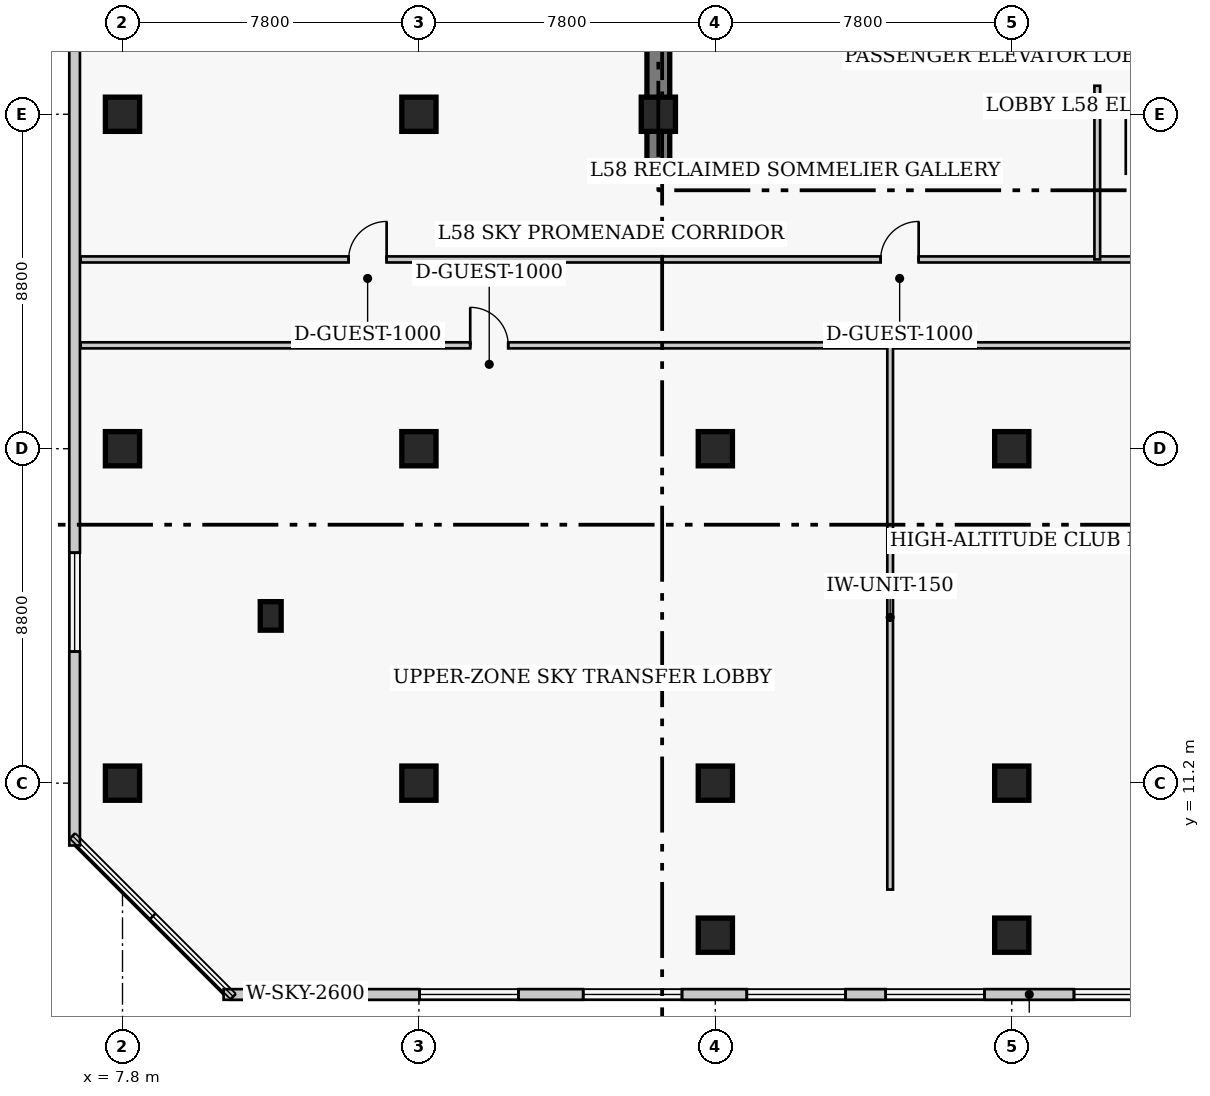
"""IFC4 building model, lengths in metres.
Left out: names, types, materials, properties, quantities, classifications, styles, units other than length and angle.
Written with IfcOpenShell. Run it as: python <this file> out.ifc"""

import sys

from ifc_helpers import new_model, si_unit, direction, frame, frame_2d, origin, origin_2d, place, context, subcontext, project, spatial, rectangle, extrude, element, fill, save


model = new_model("IFC4")
c1 = context("Model", 3, precision=1e-05, world=origin(), true_north=direction((0.0, 1.0)))
c2 = subcontext(c1, "Body", "Model", "MODEL_VIEW")
j1 = project(units=[si_unit("LENGTHUNIT", "METRE"), si_unit("PLANEANGLEUNIT", "RADIAN")], contexts=[c1])
p1 = place(None, origin())
s1 = spatial("IfcSite", under=j1, at=p1, CompositionType="ELEMENT")
p2 = place(p1, origin())
s2 = spatial("IfcBuilding", under=s1, at=p2, CompositionType="ELEMENT")
p3 = place(p2, frame((0.0, 0.0, 231.9)))
s3 = spatial("IfcBuildingStorey", under=s2, at=p3, CompositionType="ELEMENT", Elevation=231.9)
p4 = place(p3, frame((21.9, 27.05, 0.0), z_axis=(0.0, 0.0, 1.0), x_axis=(0.0, 1.0, 0.0)))
e1 = element("IfcWall", 1, at=p4, inside=s3, PredefinedType="SHEAR", context=c2, shape_type="SweptSolid", body=[
    extrude(rectangle(XDim=13.57, YDim=0.6, at=frame_2d((6.785, 0.0))), origin(), (0.0, 0.0, 1.0), 4.6),
])
for number, where, z_axis, x_axis in (
    (2, (7.8, 11.2, 0.0), (0.0, 0.0, 1.0), (1.0, 0.0, 0.0)),
    (3, (7.8, 20.0, 0.0), (0.0, 0.0, 1.0), (1.0, 0.0, 0.0)),
    (4, (7.8, 28.8, 0.0), (0.0, 0.0, 1.0), (1.0, 0.0, 0.0)),
    (5, (15.6, 11.2, 0.0), (0.0, 0.0, 1.0), (1.0, 0.0, 0.0)),
    (6, (15.6, 20.0, 0.0), (0.0, 0.0, 1.0), (1.0, 0.0, 0.0)),
    (7, (15.6, 28.8, 0.0), (0.0, 0.0, 1.0), (1.0, 0.0, 0.0)),
    (8, (23.4, 11.2, 0.0), (0.0, 0.0, 1.0), (1.0, 0.0, 0.0)),
    (9, (23.4, 20.0, 0.0), (0.0, 0.0, 1.0), (1.0, 0.0, 0.0)),
    (10, (31.2, 11.2, 0.0), (0.0, 0.0, 1.0), (1.0, 0.0, 0.0)),
    (11, (31.2, 20.0, 0.0), (0.0, 0.0, 1.0), (1.0, 0.0, 0.0)),
    (12, (21.9, 28.8, 0.0), (0.0, 0.0, 1.0), (1.0, 0.0, 0.0)),
    (13, (23.4, 7.2, 0.0), (0.0, 0.0, 1.0), (1.0, 0.0, 0.0)),
    (14, (31.2, 7.2, 0.0), (0.0, 0.0, 1.0), (1.0, 0.0, 0.0)),
):
    element("IfcColumn", number, at=place(p3, frame(where, z_axis=z_axis, x_axis=x_axis)), inside=s3, PredefinedType="COLUMN", context=c2, shape_type="SweptSolid", body=[
        extrude(rectangle(XDim=0.9, YDim=0.9, at=origin_2d()), origin(), (0.0, 0.0, 1.0), 4.6),
    ])
p5 = place(p3, frame((11.7, 15.6, 0.0), z_axis=(0.0, 0.0, 1.0), x_axis=(1.0, 0.0, 0.0)))
e15 = element("IfcColumn", 15, at=p5, inside=s3, PredefinedType="PILASTER", context=c2, shape_type="SweptSolid", body=[
    extrude(rectangle(XDim=0.55, YDim=0.75, at=origin_2d()), origin(), (0.0, 0.0, 1.0), 4.6),
])
p6 = place(p3, frame((10.46, 5.64, 0.0), z_axis=(0.0, 0.0, 1.0), x_axis=(1.0, 0.0, 0.0)))
e16 = element("IfcWall", 16, at=p6, inside=s3, PredefinedType="SOLIDWALL", context=c2, shape_type="SweptSolid", body=[
    extrude(rectangle(XDim=25.83, YDim=0.28, at=frame_2d((12.915, 0.0))), origin(), (0.0, 0.0, 1.0), 4.35),
])
p7 = place(p6, frame((0.853, 0.0, 0.65)))
e17 = element("IfcOpeningElement", 17, at=p7, cuts=e16, PredefinedType="OPENING", context=c2, shape_type="SweptSolid", body=[
    extrude(rectangle(XDim=2.6, YDim=2.2, at=frame_2d((1.3, 1.1))), frame((0.0, 0.15, 0.0), z_axis=(0.0, -1.0, 0.0), x_axis=(1.0, 0.0, 0.0)), (0.0, 0.0, 1.0), 0.3),
])
p8 = place(p6, frame((5.157, 0.0, 0.65)))
e18 = element("IfcOpeningElement", 18, at=p8, cuts=e16, PredefinedType="OPENING", context=c2, shape_type="SweptSolid", body=[
    extrude(rectangle(XDim=2.6, YDim=2.2, at=frame_2d((1.3, 1.1))), frame((0.0, 0.15, 0.0), z_axis=(0.0, -1.0, 0.0), x_axis=(1.0, 0.0, 0.0)), (0.0, 0.0, 1.0), 0.3),
])
p9 = place(p6, frame((9.462, 0.0, 0.65)))
e19 = element("IfcOpeningElement", 19, at=p9, cuts=e16, PredefinedType="OPENING", context=c2, shape_type="SweptSolid", body=[
    extrude(rectangle(XDim=2.6, YDim=2.2, at=frame_2d((1.3, 1.1))), frame((0.0, 0.15, 0.0), z_axis=(0.0, -1.0, 0.0), x_axis=(1.0, 0.0, 0.0)), (0.0, 0.0, 1.0), 0.3),
])
p10 = place(p6, frame((13.768, 0.0, 0.65)))
e20 = element("IfcOpeningElement", 20, at=p10, cuts=e16, PredefinedType="OPENING", context=c2, shape_type="SweptSolid", body=[
    extrude(rectangle(XDim=2.6, YDim=2.2, at=frame_2d((1.3, 1.1))), frame((0.0, 0.15, 0.0), z_axis=(0.0, -1.0, 0.0), x_axis=(1.0, 0.0, 0.0)), (0.0, 0.0, 1.0), 0.3),
])
p11 = place(p6, frame((17.423, 0.0, 0.65)))
e21 = element("IfcOpeningElement", 21, at=p11, cuts=e16, PredefinedType="OPENING", context=c2, shape_type="SweptSolid", body=[
    extrude(rectangle(XDim=2.6, YDim=2.2, at=frame_2d((1.3, 1.1))), frame((0.0, 0.15, 0.0), z_axis=(0.0, -1.0, 0.0), x_axis=(1.0, 0.0, 0.0)), (0.0, 0.0, 1.0), 0.3),
])
p12 = place(p6, frame((22.377, 0.0, 0.65)))
e22 = element("IfcOpeningElement", 22, at=p12, cuts=e16, PredefinedType="OPENING", context=c2, shape_type="SweptSolid", body=[
    extrude(rectangle(XDim=2.6, YDim=2.2, at=frame_2d((1.3, 1.1))), frame((0.0, 0.15, 0.0), z_axis=(0.0, -1.0, 0.0), x_axis=(1.0, 0.0, 0.0)), (0.0, 0.0, 1.0), 0.3),
])
p13 = place(p3, frame((6.54, 39.44, 0.0), z_axis=(0.0, 0.0, 1.0), x_axis=(0.0, -1.0, 0.0)))
e23 = element("IfcWall", 23, at=p13, inside=s3, PredefinedType="SOLIDWALL", context=c2, shape_type="SweptSolid", body=[
    extrude(rectangle(XDim=29.88, YDim=0.28, at=frame_2d((14.94, 0.0))), origin(), (0.0, 0.0, 1.0), 4.35),
])
p14 = place(p13, frame((1.984, 0.0, 0.65)))
e24 = element("IfcOpeningElement", 24, at=p14, cuts=e23, PredefinedType="OPENING", context=c2, shape_type="SweptSolid", body=[
    extrude(rectangle(XDim=2.6, YDim=2.2, at=frame_2d((1.3, 1.1))), frame((0.0, 0.15, 0.0), z_axis=(0.0, -1.0, 0.0), x_axis=(1.0, 0.0, 0.0)), (0.0, 0.0, 1.0), 0.3),
])
p15 = place(p13, frame((5.103, 0.0, 0.65)))
e25 = element("IfcOpeningElement", 25, at=p15, cuts=e23, PredefinedType="OPENING", context=c2, shape_type="SweptSolid", body=[
    extrude(rectangle(XDim=2.6, YDim=2.2, at=frame_2d((1.3, 1.1))), frame((0.0, 0.15, 0.0), z_axis=(0.0, -1.0, 0.0), x_axis=(1.0, 0.0, 0.0)), (0.0, 0.0, 1.0), 0.3),
])
p16 = place(p13, frame((22.177, 0.0, 0.65)))
e26 = element("IfcOpeningElement", 26, at=p16, cuts=e23, PredefinedType="OPENING", context=c2, shape_type="SweptSolid", body=[
    extrude(rectangle(XDim=2.6, YDim=2.2, at=frame_2d((1.3, 1.1))), frame((0.0, 0.15, 0.0), z_axis=(0.0, -1.0, 0.0), x_axis=(1.0, 0.0, 0.0)), (0.0, 0.0, 1.0), 0.3),
])
p17 = place(p3, frame((6.7, 22.72, 0.0), z_axis=(0.0, 0.0, 1.0), x_axis=(1.0, 0.0, 0.0)))
e27 = element("IfcWall", 27, at=p17, inside=s3, PredefinedType="PARTITIONING", context=c2, shape_type="SweptSolid", body=[
    extrude(rectangle(XDim=64.6, YDim=0.16, at=frame_2d((32.3, 0.0))), origin(), (0.0, 0.0, 1.0), 4.35),
])
p18 = place(p17, frame((10.25, 0.0, 0.0)))
e28 = element("IfcOpeningElement", 28, at=p18, cuts=e27, PredefinedType="OPENING", context=c2, shape_type="SweptSolid", body=[
    extrude(rectangle(XDim=1.0, YDim=2.15, at=frame_2d((0.5, 1.075))), frame((0.0, 0.09, 0.0), z_axis=(0.0, -1.0, 0.0), x_axis=(1.0, 0.0, 0.0)), (0.0, 0.0, 1.0), 0.18),
])
p19 = place(p17, frame((30.8, 0.0, 0.0)))
e29 = element("IfcOpeningElement", 29, at=p19, cuts=e27, PredefinedType="OPENING", context=c2, shape_type="SweptSolid", body=[
    extrude(rectangle(XDim=1.0, YDim=2.15, at=frame_2d((0.5, 1.075))), frame((0.0, 0.09, 0.0), z_axis=(0.0, -1.0, 0.0), x_axis=(1.0, 0.0, 0.0)), (0.0, 0.0, 1.0), 0.18),
])
p20 = place(p17, frame((52.35, 0.0, 0.0)))
e30 = element("IfcOpeningElement", 30, at=p20, cuts=e27, PredefinedType="OPENING", context=c2, shape_type="SweptSolid", body=[
    extrude(rectangle(XDim=1.0, YDim=2.15, at=frame_2d((0.5, 1.075))), frame((0.0, 0.09, 0.0), z_axis=(0.0, -1.0, 0.0), x_axis=(1.0, 0.0, 0.0)), (0.0, 0.0, 1.0), 0.18),
])
p21 = place(p3, frame((6.7, 24.98, 0.0), z_axis=(0.0, 0.0, 1.0), x_axis=(1.0, 0.0, 0.0)))
e31 = element("IfcWall", 31, at=p21, inside=s3, PredefinedType="PARTITIONING", context=c2, shape_type="SweptSolid", body=[
    extrude(rectangle(XDim=64.6, YDim=0.16, at=frame_2d((32.3, 0.0))), origin(), (0.0, 0.0, 1.0), 4.35),
])
p22 = place(p21, frame((30.4, 0.0, 0.0)))
e32 = element("IfcOpeningElement", 32, at=p22, cuts=e31, PredefinedType="OPENING", context=c2, shape_type="SweptSolid", body=[
    extrude(rectangle(XDim=1.8, YDim=2.2, at=frame_2d((0.9, 1.1))), frame((0.0, 0.09, 0.0), z_axis=(0.0, -1.0, 0.0), x_axis=(1.0, 0.0, 0.0)), (0.0, 0.0, 1.0), 0.18),
])
p23 = place(p21, frame((21.05, 0.0, 0.0)))
e33 = element("IfcOpeningElement", 33, at=p23, cuts=e31, PredefinedType="OPENING", context=c2, shape_type="SweptSolid", body=[
    extrude(rectangle(XDim=1.0, YDim=2.15, at=frame_2d((0.5, 1.075))), frame((0.0, 0.09, 0.0), z_axis=(0.0, -1.0, 0.0), x_axis=(1.0, 0.0, 0.0)), (0.0, 0.0, 1.0), 0.18),
])
p24 = place(p21, frame((7.05, 0.0, 0.0)))
e34 = element("IfcOpeningElement", 34, at=p24, cuts=e31, PredefinedType="OPENING", context=c2, shape_type="SweptSolid", body=[
    extrude(rectangle(XDim=1.0, YDim=2.15, at=frame_2d((0.5, 1.075))), frame((0.0, 0.09, 0.0), z_axis=(0.0, -1.0, 0.0), x_axis=(1.0, 0.0, 0.0)), (0.0, 0.0, 1.0), 0.18),
])
p25 = place(p21, frame((51.91, 0.0, 0.0)))
e35 = element("IfcOpeningElement", 35, at=p25, cuts=e31, PredefinedType="OPENING", context=c2, shape_type="SweptSolid", body=[
    extrude(rectangle(XDim=0.88, YDim=2.05, at=frame_2d((0.44, 1.025))), frame((0.0, 0.09, 0.0), z_axis=(0.0, -1.0, 0.0), x_axis=(1.0, 0.0, 0.0)), (0.0, 0.0, 1.0), 0.18),
])
p26 = place(p21, frame((54.15, 0.0, 0.0)))
e36 = element("IfcOpeningElement", 36, at=p26, cuts=e31, PredefinedType="OPENING", context=c2, shape_type="SweptSolid", body=[
    extrude(rectangle(XDim=1.0, YDim=2.15, at=frame_2d((0.5, 1.075))), frame((0.0, 0.09, 0.0), z_axis=(0.0, -1.0, 0.0), x_axis=(1.0, 0.0, 0.0)), (0.0, 0.0, 1.0), 0.18),
])
p27 = place(p3, frame((33.45, 24.98, 0.0), z_axis=(0.0, 0.0, 1.0), x_axis=(0.0, 1.0, 0.0)))
e37 = element("IfcWall", 37, at=p27, inside=s3, PredefinedType="PARTITIONING", context=c2, shape_type="SweptSolid", body=[
    extrude(rectangle(XDim=4.57, YDim=0.15, at=frame_2d((2.285, 0.0))), origin(), (0.0, 0.0, 1.0), 4.35),
])
p28 = place(p3, frame((28.0, 8.4, 0.0), z_axis=(0.0, 0.0, 1.0), x_axis=(0.0, 1.0, 0.0)))
e38 = element("IfcWall", 38, at=p28, inside=s3, PredefinedType="PARTITIONING", context=c2, shape_type="SweptSolid", body=[
    extrude(rectangle(XDim=14.32, YDim=0.15, at=frame_2d((7.16, 0.0))), origin(), (0.0, 0.0, 1.0), 3.946),
])
p29 = place(p7, origin())
e39 = element("IfcWindow", 39, at=p29, inside=s3, PartitioningType="SINGLE_PANEL", PredefinedType="WINDOW", context=c2, shape_type="SweptSolid", body=[
    extrude(rectangle(XDim=2.6, YDim=2.2, at=frame_2d((1.3, 1.1))), frame((0.0, 0.03, 0.0), z_axis=(0.0, -1.0, 0.0), x_axis=(1.0, 0.0, 0.0)), (0.0, 0.0, 1.0), 0.06),
])
fill(e17, e39)
p30 = place(p8, origin())
e40 = element("IfcWindow", 40, at=p30, inside=s3, PartitioningType="SINGLE_PANEL", PredefinedType="WINDOW", context=c2, shape_type="SweptSolid", body=[
    extrude(rectangle(XDim=2.6, YDim=2.2, at=frame_2d((1.3, 1.1))), frame((0.0, 0.03, 0.0), z_axis=(0.0, -1.0, 0.0), x_axis=(1.0, 0.0, 0.0)), (0.0, 0.0, 1.0), 0.06),
])
fill(e18, e40)
p31 = place(p9, origin())
e41 = element("IfcWindow", 41, at=p31, inside=s3, PartitioningType="SINGLE_PANEL", PredefinedType="WINDOW", context=c2, shape_type="SweptSolid", body=[
    extrude(rectangle(XDim=2.6, YDim=2.2, at=frame_2d((1.3, 1.1))), frame((0.0, 0.03, 0.0), z_axis=(0.0, -1.0, 0.0), x_axis=(1.0, 0.0, 0.0)), (0.0, 0.0, 1.0), 0.06),
])
fill(e19, e41)
p32 = place(p10, origin())
e42 = element("IfcWindow", 42, at=p32, inside=s3, PartitioningType="SINGLE_PANEL", PredefinedType="WINDOW", context=c2, shape_type="SweptSolid", body=[
    extrude(rectangle(XDim=2.6, YDim=2.2, at=frame_2d((1.3, 1.1))), frame((0.0, 0.03, 0.0), z_axis=(0.0, -1.0, 0.0), x_axis=(1.0, 0.0, 0.0)), (0.0, 0.0, 1.0), 0.06),
])
fill(e20, e42)
p33 = place(p11, origin())
e43 = element("IfcWindow", 43, at=p33, inside=s3, PartitioningType="SINGLE_PANEL", PredefinedType="WINDOW", context=c2, shape_type="SweptSolid", body=[
    extrude(rectangle(XDim=2.6, YDim=2.2, at=frame_2d((1.3, 1.1))), frame((0.0, 0.03, 0.0), z_axis=(0.0, -1.0, 0.0), x_axis=(1.0, 0.0, 0.0)), (0.0, 0.0, 1.0), 0.06),
])
fill(e21, e43)
p34 = place(p12, origin())
e44 = element("IfcWindow", 44, at=p34, inside=s3, PartitioningType="SINGLE_PANEL", PredefinedType="WINDOW", context=c2, shape_type="SweptSolid", body=[
    extrude(rectangle(XDim=2.6, YDim=2.2, at=frame_2d((1.3, 1.1))), frame((0.0, 0.03, 0.0), z_axis=(0.0, -1.0, 0.0), x_axis=(1.0, 0.0, 0.0)), (0.0, 0.0, 1.0), 0.06),
])
fill(e22, e44)
p35 = place(p16, origin())
e45 = element("IfcWindow", 45, at=p35, inside=s3, PartitioningType="SINGLE_PANEL", PredefinedType="WINDOW", context=c2, shape_type="SweptSolid", body=[
    extrude(rectangle(XDim=2.6, YDim=2.2, at=frame_2d((1.3, 1.1))), frame((0.0, 0.03, 0.0), z_axis=(0.0, -1.0, 0.0), x_axis=(1.0, 0.0, 0.0)), (0.0, 0.0, 1.0), 0.06),
])
fill(e26, e45)
p36 = place(p23, origin())
e46 = element("IfcDoor", 46, at=p36, inside=s3, OperationType="SINGLE_SWING_RIGHT", PredefinedType="DOOR", context=c2, shape_type="SweptSolid", body=[
    extrude(rectangle(XDim=1.0, YDim=2.15, at=frame_2d((0.5, 1.075))), frame((0.0, 0.025, 0.0), z_axis=(0.0, -1.0, 0.0), x_axis=(1.0, 0.0, 0.0)), (0.0, 0.0, 1.0), 0.05),
])
fill(e33, e46)
p37 = place(p18, origin())
e47 = element("IfcDoor", 47, at=p37, inside=s3, OperationType="SINGLE_SWING_LEFT", PredefinedType="DOOR", context=c2, shape_type="SweptSolid", body=[
    extrude(rectangle(XDim=1.0, YDim=2.15, at=frame_2d((0.5, 1.075))), frame((0.0, 0.025, 0.0), z_axis=(0.0, -1.0, 0.0), x_axis=(1.0, 0.0, 0.0)), (0.0, 0.0, 1.0), 0.05),
])
fill(e28, e47)
p38 = place(p24, origin())
e48 = element("IfcDoor", 48, at=p38, inside=s3, OperationType="SINGLE_SWING_RIGHT", PredefinedType="DOOR", context=c2, shape_type="SweptSolid", body=[
    extrude(rectangle(XDim=1.0, YDim=2.15, at=frame_2d((0.5, 1.075))), frame((0.0, 0.025, 0.0), z_axis=(0.0, -1.0, 0.0), x_axis=(1.0, 0.0, 0.0)), (0.0, 0.0, 1.0), 0.05),
])
fill(e34, e48)
save(model, sys.argv[1])
